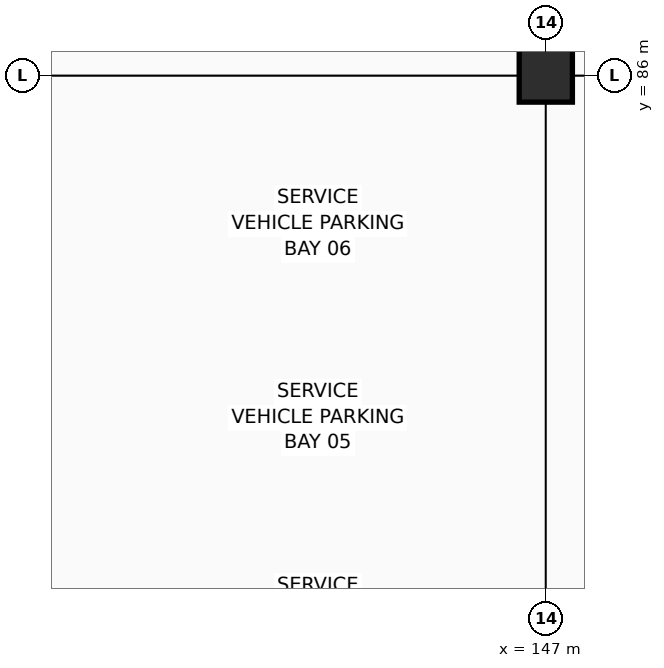
"""IFC4 building model, lengths in metres.
Left out: names, types, materials, properties, quantities, classifications, styles, units other than length and angle.
Written with IfcOpenShell. Run it as: python <this file> out.ifc"""

import sys

from ifc_helpers import new_model, si_unit, direction, frame, origin, origin_2d, place, context, subcontext, project, spatial, rectangle, extrude, element, save


model = new_model("IFC4")
c1 = context("Model", 3, precision=1e-05, world=origin(), true_north=direction((0.0, 1.0)))
c2 = subcontext(c1, "Body", "Model", "MODEL_VIEW")
j1 = project(units=[si_unit("LENGTHUNIT", "METRE"), si_unit("PLANEANGLEUNIT", "RADIAN")], contexts=[c1])
p1 = place(None, origin())
s1 = spatial("IfcSite", under=j1, at=p1, CompositionType="ELEMENT")
p2 = place(p1, origin())
s2 = spatial("IfcBuilding", under=s1, at=p2, CompositionType="ELEMENT")
p3 = place(p2, frame((0.0, 0.0, -4.5)))
s3 = spatial("IfcBuildingStorey", under=s2, at=p3, CompositionType="ELEMENT", Elevation=-4.5)
p4 = place(p3, frame((147.0, 86.0, 0.0), z_axis=(0.0, 0.0, 1.0), x_axis=(1.0, 0.0, 0.0)))
e1 = element("IfcColumn", 1, at=p4, inside=s3, PredefinedType="COLUMN", context=c2, shape_type="SweptSolid", body=[
    extrude(rectangle(XDim=0.7, YDim=0.7, at=origin_2d()), origin(), (0.0, 0.0, 1.0), 4.5),
])
save(model, sys.argv[1])
